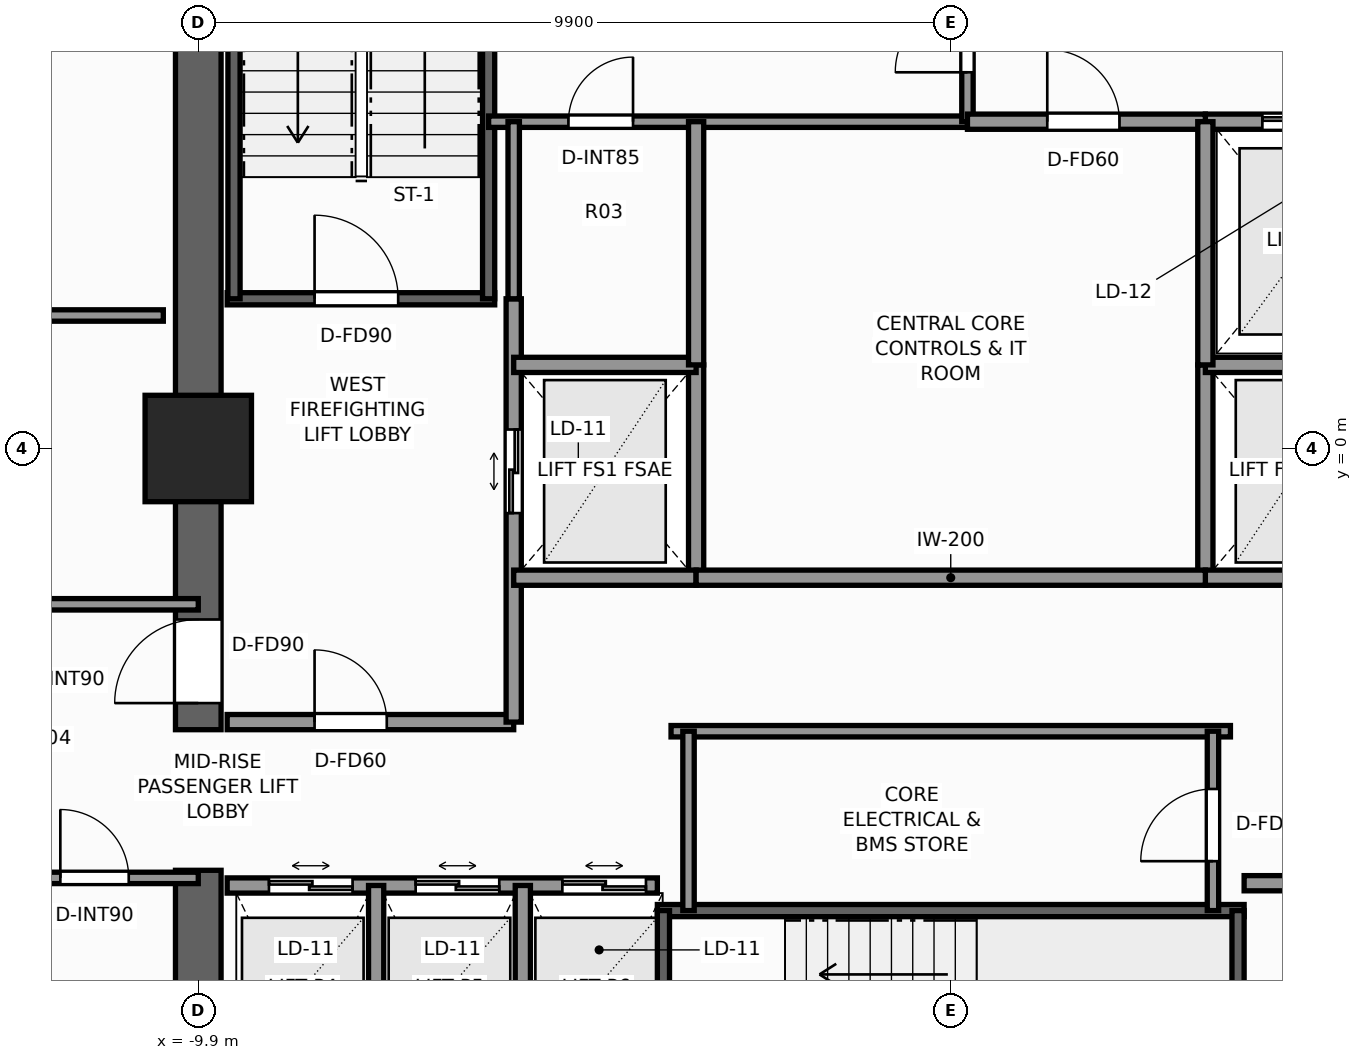
"""IFC4 building model, lengths in metres.
Left out: names, types, materials, properties, quantities, classifications, styles, units other than length and angle.
Written with IfcOpenShell. Run it as: python <this file> out.ifc"""

import sys

from ifc_helpers import new_model, si_unit, direction, frame, frame_2d, origin, origin_2d, place, context, subcontext, project, spatial, rectangle, extrude, element, fill, save


model = new_model("IFC4")
c1 = context("Model", 3, precision=1e-05, world=origin(), true_north=direction((0.0, 1.0)))
c2 = subcontext(c1, "Body", "Model", "MODEL_VIEW")
j1 = project(units=[si_unit("LENGTHUNIT", "METRE"), si_unit("PLANEANGLEUNIT", "RADIAN")], contexts=[c1])
p1 = place(None, origin())
s1 = spatial("IfcSite", under=j1, at=p1, CompositionType="ELEMENT")
p2 = place(p1, origin())
s2 = spatial("IfcBuilding", under=s1, at=p2, CompositionType="ELEMENT")
p3 = place(p2, frame((0.0, 0.0, 75.5)))
s3 = spatial("IfcBuildingStorey", under=s2, at=p3, CompositionType="ELEMENT", Elevation=75.5)
p4 = place(p3, frame((-9.9, -9.6, 0.0), z_axis=(0.0, 0.0, 1.0), x_axis=(0.0, 1.0, 0.0)))
e1 = element("IfcWall", 1, at=p4, inside=s3, PredefinedType="SHEAR", context=c2, shape_type="SweptSolid", body=[
    extrude(rectangle(XDim=4.05, YDim=0.6, at=frame_2d((2.025, 0.0))), origin(), (0.0, 0.0, 1.0), 3.3),
])
p5 = place(p3, frame((-9.9, -3.7, 0.0), z_axis=(0.0, 0.0, 1.0), x_axis=(0.0, 1.0, 0.0)))
e2 = element("IfcWall", 2, at=p5, inside=s3, PredefinedType="SHEAR", context=c2, shape_type="SweptSolid", body=[
    extrude(rectangle(XDim=13.3, YDim=0.6, at=frame_2d((6.65, 0.0))), origin(), (0.0, 0.0, 1.0), 3.3),
])
p6 = place(p5, frame((0.35, 0.0, 0.0)))
e3 = element("IfcOpeningElement", 3, at=p6, cuts=e2, PredefinedType="OPENING", context=c2, shape_type="SweptSolid", body=[
    extrude(rectangle(XDim=1.1, YDim=2.2, at=frame_2d((0.55, 1.1))), frame((0.0, 0.31, 0.0), z_axis=(0.0, -1.0, 0.0), x_axis=(1.0, 0.0, 0.0)), (0.0, 0.0, 1.0), 0.62),
])
p7 = place(p3, frame((-9.9, 0.0, 0.0), z_axis=(0.0, 0.0, 1.0), x_axis=(1.0, 0.0, 0.0)))
e4 = element("IfcColumn", 4, at=p7, inside=s3, PredefinedType="COLUMN", context=c2, shape_type="SweptSolid", body=[
    extrude(rectangle(XDim=1.4, YDim=1.4, at=origin_2d()), origin(), (0.0, 0.0, 1.0), 3.3),
])
p8 = place(p3, frame((-9.52, 1.97, 0.0), z_axis=(0.0, 0.0, 1.0), x_axis=(1.0, 0.0, 0.0)))
e5 = element("IfcWall", 5, at=p8, inside=s3, PredefinedType="SHEAR", context=c2, shape_type="SweptSolid", body=[
    extrude(rectangle(XDim=3.52, YDim=0.16, at=frame_2d((1.76, 0.0))), origin(), (0.0, 0.0, 1.0), 3.3),
])
p9 = place(p8, frame((1.15, 0.0, 0.0)))
e6 = element("IfcOpeningElement", 6, at=p9, cuts=e5, PredefinedType="OPENING", context=c2, shape_type="SweptSolid", body=[
    extrude(rectangle(XDim=1.1, YDim=2.2, at=frame_2d((0.55, 1.1))), frame((0.0, 0.09, 0.0), z_axis=(0.0, -1.0, 0.0), x_axis=(1.0, 0.0, 0.0)), (0.0, 0.0, 1.0), 0.18),
])
for number, where, z_axis, x_axis in (
    (7, (-9.43, 1.97, 0.0), (0.0, 0.0, 1.0), (0.0, 1.0, 0.0)),
    (8, (-6.08, 1.97, 0.0), (0.0, 0.0, 1.0), (0.0, 1.0, 0.0)),
):
    element("IfcWall", number, at=place(p3, frame(where, z_axis=z_axis, x_axis=x_axis)), inside=s3, PredefinedType="SHEAR", context=c2, shape_type="SweptSolid", body=[
        extrude(rectangle(XDim=7.56, YDim=0.16, at=frame_2d((3.78, 0.0))), origin(), (0.0, 0.0, 1.0), 3.3),
    ])
p10 = place(p3, frame((-3.86, -6.08, 0.0), z_axis=(0.0, 0.0, 1.0), x_axis=(1.0, 0.0, 0.0)))
e9 = element("IfcWall", 9, at=p10, inside=s3, PredefinedType="SHEAR", context=c2, shape_type="SweptSolid", body=[
    extrude(rectangle(XDim=7.72, YDim=0.16, at=frame_2d((3.86, 0.0))), origin(), (0.0, 0.0, 1.0), 3.3),
])
for number, where, z_axis, x_axis in (
    (10, (-3.78, -9.43, 0.0), (0.0, 0.0, 1.0), (0.0, 1.0, 0.0)),
    (11, (3.78, -9.43, 0.0), (0.0, 0.0, 1.0), (0.0, 1.0, 0.0)),
):
    element("IfcWall", number, at=place(p3, frame(where, z_axis=z_axis, x_axis=x_axis)), inside=s3, PredefinedType="SHEAR", context=c2, shape_type="SweptSolid", body=[
        extrude(rectangle(XDim=3.35, YDim=0.16, at=frame_2d((1.675, 0.0))), origin(), (0.0, 0.0, 1.0), 3.3),
    ])
p11 = place(p3, frame((-9.52, -3.6, 0.0), z_axis=(0.0, 0.0, 1.0), x_axis=(1.0, 0.0, 0.0)))
e12 = element("IfcWall", 12, at=p11, inside=s3, PredefinedType="SOLIDWALL", context=c2, shape_type="SweptSolid", body=[
    extrude(rectangle(XDim=3.77, YDim=0.2, at=frame_2d((1.885, 0.0))), origin(), (0.0, 0.0, 1.0), 3.08),
])
p12 = place(p11, frame((1.15, 0.0, 0.0)))
e13 = element("IfcOpeningElement", 13, at=p12, cuts=e12, PredefinedType="OPENING", context=c2, shape_type="SweptSolid", body=[
    extrude(rectangle(XDim=0.95, YDim=2.06, at=frame_2d((0.475, 1.03))), frame((0.0, 0.11, 0.0), z_axis=(0.0, -1.0, 0.0), x_axis=(1.0, 0.0, 0.0)), (0.0, 0.0, 1.0), 0.22),
])
p13 = place(p3, frame((-5.75, -3.6, 0.0), z_axis=(0.0, 0.0, 1.0), x_axis=(0.0, 1.0, 0.0)))
e14 = element("IfcWall", 14, at=p13, inside=s3, PredefinedType="SOLIDWALL", context=c2, shape_type="SweptSolid", body=[
    extrude(rectangle(XDim=5.57, YDim=0.2, at=frame_2d((2.785, 0.0))), origin(), (0.0, 0.0, 1.0), 3.08),
])
p14 = place(p13, frame((2.75, 0.0, 0.0)))
e15 = element("IfcOpeningElement", 15, at=p14, cuts=e14, PredefinedType="OPENING", context=c2, shape_type="SweptSolid", body=[
    extrude(rectangle(XDim=1.1, YDim=2.2, at=frame_2d((0.55, 1.1))), frame((0.0, 0.11, 0.0), z_axis=(0.0, -1.0, 0.0), x_axis=(1.0, 0.0, 0.0)), (0.0, 0.0, 1.0), 0.22),
])
p15 = place(p3, frame((-3.35, -1.7, 0.0), z_axis=(0.0, 0.0, 1.0), x_axis=(0.0, 1.0, 0.0)))
e16 = element("IfcWall", 16, at=p15, inside=s3, PredefinedType="SOLIDWALL", context=c2, shape_type="SweptSolid", body=[
    extrude(rectangle(XDim=2.8, YDim=0.2, at=frame_2d((1.4, 0.0))), origin(), (0.0, 0.0, 1.0), 3.08),
])
for number, where, z_axis, x_axis in (
    (17, (-5.75, -1.7, 0.0), (0.0, 0.0, 1.0), (1.0, 0.0, 0.0)),
    (18, (-5.75, 1.1, 0.0), (0.0, 0.0, 1.0), (1.0, 0.0, 0.0)),
):
    element("IfcWall", number, at=place(p3, frame(where, z_axis=z_axis, x_axis=x_axis)), inside=s3, PredefinedType="SOLIDWALL", context=c2, shape_type="SweptSolid", body=[
        extrude(rectangle(XDim=2.4, YDim=0.2, at=frame_2d((1.2, 0.0))), origin(), (0.0, 0.0, 1.0), 3.08),
    ])
p16 = place(p3, frame((3.35, -1.7, 0.0), z_axis=(0.0, 0.0, 1.0), x_axis=(0.0, 1.0, 0.0)))
e19 = element("IfcWall", 19, at=p16, inside=s3, PredefinedType="SOLIDWALL", context=c2, shape_type="SweptSolid", body=[
    extrude(rectangle(XDim=2.8, YDim=0.2, at=frame_2d((1.4, 0.0))), origin(), (0.0, 0.0, 1.0), 3.08),
])
for number, where, z_axis, x_axis in (
    (20, (3.35, -1.7, 0.0), (0.0, 0.0, 1.0), (1.0, 0.0, 0.0)),
    (21, (3.35, 1.1, 0.0), (0.0, 0.0, 1.0), (1.0, 0.0, 0.0)),
):
    element("IfcWall", number, at=place(p3, frame(where, z_axis=z_axis, x_axis=x_axis)), inside=s3, PredefinedType="SOLIDWALL", context=c2, shape_type="SweptSolid", body=[
        extrude(rectangle(XDim=2.4, YDim=0.2, at=frame_2d((1.2, 0.0))), origin(), (0.0, 0.0, 1.0), 3.08),
    ])
p17 = place(p3, frame((3.35, 4.3, 0.0), z_axis=(0.0, 0.0, 1.0), x_axis=(1.0, 0.0, 0.0)))
e22 = element("IfcWall", 22, at=p17, inside=s3, PredefinedType="SOLIDWALL", context=c2, shape_type="SweptSolid", body=[
    extrude(rectangle(XDim=2.73, YDim=0.2, at=frame_2d((1.365, 0.0))), origin(), (0.0, 0.0, 1.0), 3.08),
])
p18 = place(p17, frame((0.75, 0.0, 0.0)))
e23 = element("IfcOpeningElement", 23, at=p18, cuts=e22, PredefinedType="OPENING", context=c2, shape_type="SweptSolid", body=[
    extrude(rectangle(XDim=1.2, YDim=2.25, at=frame_2d((0.6, 1.125))), frame((0.0, 0.11, 0.0), z_axis=(0.0, -1.0, 0.0), x_axis=(1.0, 0.0, 0.0)), (0.0, 0.0, 1.0), 0.22),
])
p19 = place(p3, frame((-6.08, 4.3, 0.0), z_axis=(0.0, 0.0, 1.0), x_axis=(1.0, 0.0, 0.0)))
e24 = element("IfcWall", 24, at=p19, inside=s3, PredefinedType="PARTITIONING", context=c2, shape_type="SweptSolid", body=[
    extrude(rectangle(XDim=6.3, YDim=0.15, at=frame_2d((3.15, 0.0))), origin(), (0.0, 0.0, 1.0), 3.08),
])
p20 = place(p19, frame((1.05, 0.0, 0.0)))
e25 = element("IfcOpeningElement", 25, at=p20, cuts=e24, PredefinedType="OPENING", context=c2, shape_type="SweptSolid", body=[
    extrude(rectangle(XDim=0.85, YDim=2.03, at=frame_2d((0.425, 1.015))), frame((0.0, 0.085, 0.0), z_axis=(0.0, -1.0, 0.0), x_axis=(1.0, 0.0, 0.0)), (0.0, 0.0, 1.0), 0.17),
])
p21 = place(p3, frame((0.22, 4.3, 0.0), z_axis=(0.0, 0.0, 1.0), x_axis=(0.0, 1.0, 0.0)))
e26 = element("IfcWall", 26, at=p21, inside=s3, PredefinedType="PARTITIONING", context=c2, shape_type="SweptSolid", body=[
    extrude(rectangle(XDim=5.22, YDim=0.15, at=frame_2d((2.61, 0.0))), origin(), (0.0, 0.0, 1.0), 3.08),
])
p22 = place(p21, frame((0.65, 0.0, 0.0)))
e27 = element("IfcOpeningElement", 27, at=p22, cuts=e26, PredefinedType="OPENING", context=c2, shape_type="SweptSolid", body=[
    extrude(rectangle(XDim=0.95, YDim=2.06, at=frame_2d((0.475, 1.03))), frame((0.0, 0.085, 0.0), z_axis=(0.0, -1.0, 0.0), x_axis=(1.0, 0.0, 0.0)), (0.0, 0.0, 1.0), 0.17),
])
p23 = place(p3, frame((-9.52, -5.75, 0.0), z_axis=(0.0, 0.0, 1.0), x_axis=(1.0, 0.0, 0.0)))
e28 = element("IfcWall", 28, at=p23, inside=s3, PredefinedType="SOLIDWALL", context=c2, shape_type="SweptSolid", body=[
    extrude(rectangle(XDim=5.66, YDim=0.2, at=frame_2d((2.83, 0.0))), origin(), (0.0, 0.0, 1.0), 3.08),
])
p24 = place(p23, frame((0.55, 0.0, 0.0)))
e29 = element("IfcOpeningElement", 29, at=p24, cuts=e28, PredefinedType="OPENING", context=c2, shape_type="SweptSolid", body=[
    extrude(rectangle(XDim=1.1, YDim=2.2, at=frame_2d((0.55, 1.1))), frame((0.0, 0.11, 0.0), z_axis=(0.0, -1.0, 0.0), x_axis=(1.0, 0.0, 0.0)), (0.0, 0.0, 1.0), 0.22),
])
p25 = place(p23, frame((2.48, 0.0, 0.0)))
e30 = element("IfcOpeningElement", 30, at=p25, cuts=e28, PredefinedType="OPENING", context=c2, shape_type="SweptSolid", body=[
    extrude(rectangle(XDim=1.1, YDim=2.2, at=frame_2d((0.55, 1.1))), frame((0.0, 0.11, 0.0), z_axis=(0.0, -1.0, 0.0), x_axis=(1.0, 0.0, 0.0)), (0.0, 0.0, 1.0), 0.22),
])
p26 = place(p23, frame((4.41, 0.0, 0.0)))
e31 = element("IfcOpeningElement", 31, at=p26, cuts=e28, PredefinedType="OPENING", context=c2, shape_type="SweptSolid", body=[
    extrude(rectangle(XDim=1.1, YDim=2.2, at=frame_2d((0.55, 1.1))), frame((0.0, 0.11, 0.0), z_axis=(0.0, -1.0, 0.0), x_axis=(1.0, 0.0, 0.0)), (0.0, 0.0, 1.0), 0.22),
])
for number, where, z_axis, x_axis in (
    (32, (-7.56, -9.52, 0.0), (0.0, 0.0, 1.0), (0.0, 1.0, 0.0)),
    (33, (-5.63, -9.52, 0.0), (0.0, 0.0, 1.0), (0.0, 1.0, 0.0)),
):
    element("IfcWall", number, at=place(p3, frame(where, z_axis=z_axis, x_axis=x_axis)), inside=s3, PredefinedType="SOLIDWALL", context=c2, shape_type="SweptSolid", body=[
        extrude(rectangle(XDim=3.77, YDim=0.2, at=frame_2d((1.885, 0.0))), origin(), (0.0, 0.0, 1.0), 3.08),
    ])
p27 = place(p3, frame((3.86, -5.72, 0.0), z_axis=(0.0, 0.0, 1.0), x_axis=(1.0, 0.0, 0.0)))
e34 = element("IfcWall", 34, at=p27, inside=s3, PredefinedType="SOLIDWALL", context=c2, shape_type="SweptSolid", body=[
    extrude(rectangle(XDim=5.66, YDim=0.2, at=frame_2d((2.83, 0.0))), origin(), (0.0, 0.0, 1.0), 3.08),
])
p28 = place(p27, frame((1.8, 0.0, 0.0)))
e35 = element("IfcOpeningElement", 35, at=p28, cuts=e34, PredefinedType="OPENING", context=c2, shape_type="SweptSolid", body=[
    extrude(rectangle(XDim=0.95, YDim=2.06, at=frame_2d((0.475, 1.03))), frame((0.0, 0.11, 0.0), z_axis=(0.0, -1.0, 0.0), x_axis=(1.0, 0.0, 0.0)), (0.0, 0.0, 1.0), 0.22),
])
p29 = place(p3, frame((0.22, 4.3, 0.0), z_axis=(0.0, 0.0, 1.0), x_axis=(1.0, 0.0, 0.0)))
e36 = element("IfcWall", 36, at=p29, inside=s3, PredefinedType="SOLIDWALL", context=c2, shape_type="SweptSolid", body=[
    extrude(rectangle(XDim=3.13, YDim=0.2, at=frame_2d((1.565, 0.0))), origin(), (0.0, 0.0, 1.0), 3.08),
])
p30 = place(p29, frame((1.05, 0.0, 0.0)))
e37 = element("IfcOpeningElement", 37, at=p30, cuts=e36, PredefinedType="OPENING", context=c2, shape_type="SweptSolid", body=[
    extrude(rectangle(XDim=0.95, YDim=2.06, at=frame_2d((0.475, 1.03))), frame((0.0, 0.11, 0.0), z_axis=(0.0, -1.0, 0.0), x_axis=(1.0, 0.0, 0.0)), (0.0, 0.0, 1.0), 0.22),
])
p31 = place(p3, frame((-3.35, -1.7, 0.0), z_axis=(0.0, 0.0, 1.0), x_axis=(1.0, 0.0, 0.0)))
e38 = element("IfcWall", 38, at=p31, inside=s3, PredefinedType="SOLIDWALL", context=c2, shape_type="SweptSolid", body=[
    extrude(rectangle(XDim=6.7, YDim=0.2, at=frame_2d((3.35, 0.0))), origin(), (0.0, 0.0, 1.0), 3.08),
])
for number, where, z_axis, x_axis in (
    (39, (-3.35, 1.1, 0.0), (0.0, 0.0, 1.0), (0.0, 1.0, 0.0)),
    (40, (3.35, 1.1, 0.0), (0.0, 0.0, 1.0), (0.0, 1.0, 0.0)),
):
    element("IfcWall", number, at=place(p3, frame(where, z_axis=z_axis, x_axis=x_axis)), inside=s3, PredefinedType="SOLIDWALL", context=c2, shape_type="SweptSolid", body=[
        extrude(rectangle(XDim=3.2, YDim=0.2, at=frame_2d((1.6, 0.0))), origin(), (0.0, 0.0, 1.0), 3.08),
    ])
p32 = place(p3, frame((-3.68, -3.72, 0.0), z_axis=(0.0, 0.0, 1.0), x_axis=(1.0, 0.0, 0.0)))
e41 = element("IfcWall", 41, at=p32, inside=s3, PredefinedType="PARTITIONING", context=c2, shape_type="SweptSolid", body=[
    extrude(rectangle(XDim=7.36, YDim=0.15, at=frame_2d((3.68, 0.0))), origin(), (0.0, 0.0, 1.0), 3.08),
])
p33 = place(p3, frame((3.45, -6.08, 0.0), z_axis=(0.0, 0.0, 1.0), x_axis=(0.0, 1.0, 0.0)))
e42 = element("IfcWall", 42, at=p33, inside=s3, PredefinedType="PARTITIONING", context=c2, shape_type="SweptSolid", body=[
    extrude(rectangle(XDim=2.36, YDim=0.15, at=frame_2d((1.18, 0.0))), origin(), (0.0, 0.0, 1.0), 3.08),
])
p34 = place(p33, frame((0.65, 0.0, 0.0)))
e43 = element("IfcOpeningElement", 43, at=p34, cuts=e42, PredefinedType="OPENING", context=c2, shape_type="SweptSolid", body=[
    extrude(rectangle(XDim=0.95, YDim=2.06, at=frame_2d((0.475, 1.03))), frame((0.0, 0.085, 0.0), z_axis=(0.0, -1.0, 0.0), x_axis=(1.0, 0.0, 0.0)), (0.0, 0.0, 1.0), 0.17),
])
p35 = place(p3, frame((-3.45, -6.08, 0.0), z_axis=(0.0, 0.0, 1.0), x_axis=(0.0, 1.0, 0.0)))
e44 = element("IfcWall", 44, at=p35, inside=s3, PredefinedType="PARTITIONING", context=c2, shape_type="SweptSolid", body=[
    extrude(rectangle(XDim=2.36, YDim=0.15, at=frame_2d((1.18, 0.0))), origin(), (0.0, 0.0, 1.0), 3.08),
])
p36 = place(p3, frame((-5.75, 1.97, 0.0), z_axis=(0.0, 0.0, 1.0), x_axis=(0.0, 1.0, 0.0)))
e45 = element("IfcWall", 45, at=p36, inside=s3, PredefinedType="PARTITIONING", context=c2, shape_type="SweptSolid", body=[
    extrude(rectangle(XDim=2.33, YDim=0.15, at=frame_2d((1.165, 0.0))), origin(), (0.0, 0.0, 1.0), 3.08),
])
p37 = place(p3, frame((-12.42, -2.05, 0.0), z_axis=(0.0, 0.0, 1.0), x_axis=(1.0, 0.0, 0.0)))
e46 = element("IfcWall", 46, at=p37, inside=s3, PredefinedType="PARTITIONING", context=c2, shape_type="SweptSolid", body=[
    extrude(rectangle(XDim=2.52, YDim=0.15, at=frame_2d((1.26, 0.0))), origin(), (0.0, 0.0, 1.0), 3.08),
])
p38 = place(p3, frame((-12.42, -5.65, 0.0), z_axis=(0.0, 0.0, 1.0), x_axis=(1.0, 0.0, 0.0)))
e47 = element("IfcWall", 47, at=p38, inside=s3, PredefinedType="PARTITIONING", context=c2, shape_type="SweptSolid", body=[
    extrude(rectangle(XDim=2.52, YDim=0.15, at=frame_2d((1.26, 0.0))), origin(), (0.0, 0.0, 1.0), 3.08),
])
p39 = place(p38, frame((0.705, 0.0, 0.0)))
e48 = element("IfcOpeningElement", 48, at=p39, cuts=e47, PredefinedType="OPENING", context=c2, shape_type="SweptSolid", body=[
    extrude(rectangle(XDim=0.9, YDim=2.06, at=frame_2d((0.45, 1.03))), frame((0.0, 0.085, 0.0), z_axis=(0.0, -1.0, 0.0), x_axis=(1.0, 0.0, 0.0)), (0.0, 0.0, 1.0), 0.17),
])
p40 = place(p3, frame((-20.38, 1.75, 0.0), z_axis=(0.0, 0.0, 1.0), x_axis=(1.0, 0.0, 0.0)))
e49 = element("IfcWall", 49, at=p40, inside=s3, PredefinedType="PARTITIONING", context=c2, shape_type="SweptSolid", body=[
    extrude(rectangle(XDim=10.02, YDim=0.15, at=frame_2d((5.01, 0.0))), origin(), (0.0, 0.0, 1.0), 2.449),
])
p41 = place(p9, origin())
e50 = element("IfcDoor", 50, at=p41, inside=s3, OperationType="SINGLE_SWING_LEFT", PredefinedType="DOOR", context=c2, shape_type="SweptSolid", body=[
    extrude(rectangle(XDim=1.1, YDim=2.2, at=frame_2d((0.55, 1.1))), frame((0.0, 0.025, 0.0), z_axis=(0.0, -1.0, 0.0), x_axis=(1.0, 0.0, 0.0)), (0.0, 0.0, 1.0), 0.05),
])
fill(e6, e50)
p42 = place(p6, origin())
e51 = element("IfcDoor", 51, at=p42, inside=s3, OperationType="SINGLE_SWING_LEFT", PredefinedType="DOOR", context=c2, shape_type="SweptSolid", body=[
    extrude(rectangle(XDim=1.1, YDim=2.2, at=frame_2d((0.55, 1.1))), frame((0.0, 0.025, 0.0), z_axis=(0.0, -1.0, 0.0), x_axis=(1.0, 0.0, 0.0)), (0.0, 0.0, 1.0), 0.05),
])
fill(e3, e51)
p43 = place(p14, origin())
e52 = element("IfcDoor", 52, at=p43, inside=s3, OperationType="DOUBLE_DOOR_SLIDING", PredefinedType="DOOR", context=c2, shape_type="SweptSolid", body=[
    extrude(rectangle(XDim=1.1, YDim=2.2, at=frame_2d((0.55, 1.1))), frame((0.0, 0.025, 0.0), z_axis=(0.0, -1.0, 0.0), x_axis=(1.0, 0.0, 0.0)), (0.0, 0.0, 1.0), 0.05),
])
fill(e15, e52)
p44 = place(p18, origin())
e53 = element("IfcDoor", 53, at=p44, inside=s3, OperationType="DOUBLE_DOOR_SLIDING", PredefinedType="DOOR", context=c2, shape_type="SweptSolid", body=[
    extrude(rectangle(XDim=1.2, YDim=2.25, at=frame_2d((0.6, 1.125))), frame((0.0, 0.025, 0.0), z_axis=(0.0, -1.0, 0.0), x_axis=(1.0, 0.0, 0.0)), (0.0, 0.0, 1.0), 0.05),
])
fill(e23, e53)
p45 = place(p22, origin())
e54 = element("IfcDoor", 54, at=p45, inside=s3, OperationType="SINGLE_SWING_LEFT", PredefinedType="DOOR", context=c2, shape_type="SweptSolid", body=[
    extrude(rectangle(XDim=0.95, YDim=2.06, at=frame_2d((0.475, 1.03))), frame((0.0, 0.025, 0.0), z_axis=(0.0, -1.0, 0.0), x_axis=(1.0, 0.0, 0.0)), (0.0, 0.0, 1.0), 0.05),
])
fill(e27, e54)
p46 = place(p24, origin())
e55 = element("IfcDoor", 55, at=p46, inside=s3, OperationType="DOUBLE_DOOR_SLIDING", PredefinedType="DOOR", context=c2, shape_type="SweptSolid", body=[
    extrude(rectangle(XDim=1.1, YDim=2.2, at=frame_2d((0.55, 1.1))), frame((0.0, 0.025, 0.0), z_axis=(0.0, -1.0, 0.0), x_axis=(1.0, 0.0, 0.0)), (0.0, 0.0, 1.0), 0.05),
])
fill(e29, e55)
p47 = place(p25, origin())
e56 = element("IfcDoor", 56, at=p47, inside=s3, OperationType="DOUBLE_DOOR_SLIDING", PredefinedType="DOOR", context=c2, shape_type="SweptSolid", body=[
    extrude(rectangle(XDim=1.1, YDim=2.2, at=frame_2d((0.55, 1.1))), frame((0.0, 0.025, 0.0), z_axis=(0.0, -1.0, 0.0), x_axis=(1.0, 0.0, 0.0)), (0.0, 0.0, 1.0), 0.05),
])
fill(e30, e56)
p48 = place(p26, origin())
e57 = element("IfcDoor", 57, at=p48, inside=s3, OperationType="DOUBLE_DOOR_SLIDING", PredefinedType="DOOR", context=c2, shape_type="SweptSolid", body=[
    extrude(rectangle(XDim=1.1, YDim=2.2, at=frame_2d((0.55, 1.1))), frame((0.0, 0.025, 0.0), z_axis=(0.0, -1.0, 0.0), x_axis=(1.0, 0.0, 0.0)), (0.0, 0.0, 1.0), 0.05),
])
fill(e31, e57)
p49 = place(p12, origin())
e58 = element("IfcDoor", 58, at=p49, inside=s3, OperationType="SINGLE_SWING_LEFT", PredefinedType="DOOR", context=c2, shape_type="SweptSolid", body=[
    extrude(rectangle(XDim=0.95, YDim=2.06, at=frame_2d((0.475, 1.03))), frame((0.0, 0.025, 0.0), z_axis=(0.0, -1.0, 0.0), x_axis=(1.0, 0.0, 0.0)), (0.0, 0.0, 1.0), 0.05),
])
fill(e13, e58)
p50 = place(p30, origin())
e59 = element("IfcDoor", 59, at=p50, inside=s3, OperationType="SINGLE_SWING_LEFT", PredefinedType="DOOR", context=c2, shape_type="SweptSolid", body=[
    extrude(rectangle(XDim=0.95, YDim=2.06, at=frame_2d((0.475, 1.03))), frame((0.0, 0.025, 0.0), z_axis=(0.0, -1.0, 0.0), x_axis=(1.0, 0.0, 0.0)), (0.0, 0.0, 1.0), 0.05),
])
fill(e37, e59)
p51 = place(p34, origin())
e60 = element("IfcDoor", 60, at=p51, inside=s3, OperationType="SINGLE_SWING_LEFT", PredefinedType="DOOR", context=c2, shape_type="SweptSolid", body=[
    extrude(rectangle(XDim=0.95, YDim=2.06, at=frame_2d((0.475, 1.03))), frame((0.0, 0.025, 0.0), z_axis=(0.0, -1.0, 0.0), x_axis=(1.0, 0.0, 0.0)), (0.0, 0.0, 1.0), 0.05),
])
fill(e43, e60)
p52 = place(p20, origin())
e61 = element("IfcDoor", 61, at=p52, inside=s3, OperationType="SINGLE_SWING_RIGHT", PredefinedType="DOOR", context=c2, shape_type="SweptSolid", body=[
    extrude(rectangle(XDim=0.85, YDim=2.03, at=frame_2d((0.425, 1.015))), frame((0.0, 0.025, 0.0), z_axis=(0.0, -1.0, 0.0), x_axis=(1.0, 0.0, 0.0)), (0.0, 0.0, 1.0), 0.05),
])
fill(e25, e61)
p53 = place(p39, origin())
e62 = element("IfcDoor", 62, at=p53, inside=s3, OperationType="SINGLE_SWING_LEFT", PredefinedType="DOOR", context=c2, shape_type="SweptSolid", body=[
    extrude(rectangle(XDim=0.9, YDim=2.06, at=frame_2d((0.45, 1.03))), frame((0.0, 0.025, 0.0), z_axis=(0.0, -1.0, 0.0), x_axis=(1.0, 0.0, 0.0)), (0.0, 0.0, 1.0), 0.05),
])
fill(e48, e62)
save(model, sys.argv[1])
